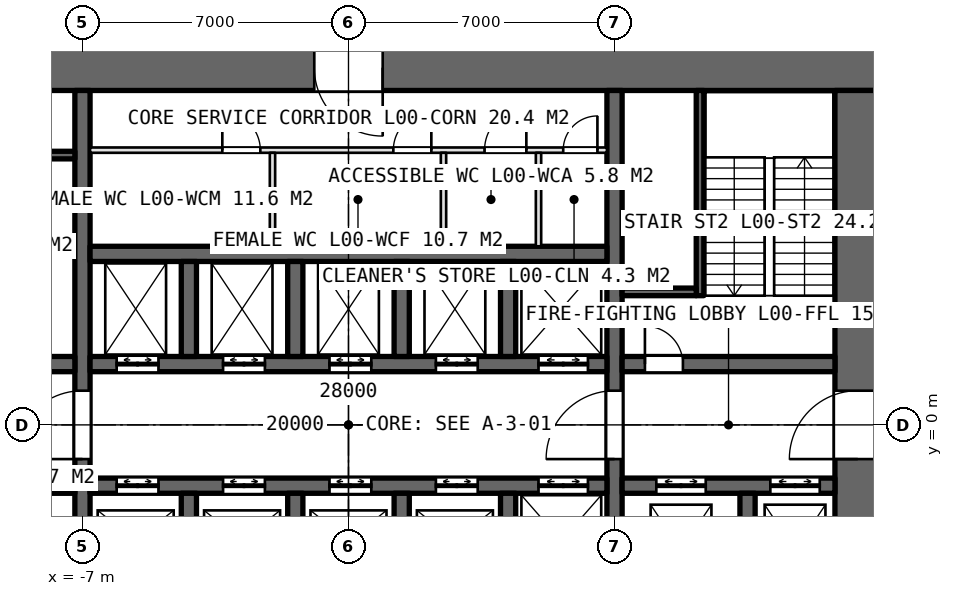
"""IFC4 building model, lengths in metres.
Left out: names, types, materials, properties, quantities, classifications, styles, units other than length and angle.
Written with IfcOpenShell. Run it as: python <this file> out.ifc"""

import sys

from ifc_helpers import new_model, si_unit, direction, frame, frame_2d, origin, place, context, subcontext, project, spatial, rectangle, extrude, element, fill, save


model = new_model("IFC4")
c1 = context("Model", 3, precision=1e-05, world=origin(), true_north=direction((0.0, 1.0)))
c2 = subcontext(c1, "Body", "Model", "MODEL_VIEW")
j1 = project(units=[si_unit("LENGTHUNIT", "METRE"), si_unit("PLANEANGLEUNIT", "RADIAN")], contexts=[c1])
p1 = place(None, origin())
s1 = spatial("IfcSite", under=j1, at=p1, CompositionType="ELEMENT")
p2 = place(p1, origin())
s2 = spatial("IfcBuilding", under=s1, at=p2, CompositionType="ELEMENT")
p3 = place(p2, origin())
s3 = spatial("IfcBuildingStorey", under=s2, at=p3, CompositionType="ELEMENT", Elevation=0.0)
p4 = place(p3, frame((14.0, 9.4, -0.3), z_axis=(0.0, 0.0, 1.0), x_axis=(-1.0, 0.0, 0.0)))
e1 = element("IfcWall", 1, at=p4, inside=s3, PredefinedType="SHEAR", context=c2, shape_type="SweptSolid", body=[
    extrude(rectangle(XDim=28.0, YDim=1.2, at=frame_2d((14.0, 0.0))), origin(), (0.0, 0.0, 1.0), 5.3),
])
p5 = place(p4, frame((24.0, 0.0, 0.3)))
e2 = element("IfcOpeningElement", 2, at=p5, cuts=e1, PredefinedType="OPENING", context=c2, shape_type="SweptSolid", body=[
    extrude(rectangle(XDim=1.0, YDim=2.4, at=frame_2d((0.5, 1.2))), frame((0.0, 0.61, 0.0), z_axis=(0.0, -1.0, 0.0), x_axis=(1.0, 0.0, 0.0)), (0.0, 0.0, 1.0), 1.22),
])
p6 = place(p4, frame((13.1, 0.0, 0.3)))
e3 = element("IfcOpeningElement", 3, at=p6, cuts=e1, PredefinedType="OPENING", context=c2, shape_type="SweptSolid", body=[
    extrude(rectangle(XDim=1.8, YDim=2.4, at=frame_2d((0.9, 1.2))), frame((0.0, 0.61, 0.0), z_axis=(0.0, -1.0, 0.0), x_axis=(1.0, 0.0, 0.0)), (0.0, 0.0, 1.0), 1.22),
])
p7 = place(p3, frame((13.4, -8.8, -0.3), z_axis=(0.0, 0.0, 1.0), x_axis=(0.0, 1.0, 0.0)))
e4 = element("IfcWall", 4, at=p7, inside=s3, PredefinedType="SHEAR", context=c2, shape_type="SweptSolid", body=[
    extrude(rectangle(XDim=17.6, YDim=1.2, at=frame_2d((8.8, 0.0))), origin(), (0.0, 0.0, 1.0), 5.3),
])
p8 = place(p7, frame((7.9, 0.0, 0.3)))
e5 = element("IfcOpeningElement", 5, at=p8, cuts=e4, PredefinedType="OPENING", context=c2, shape_type="SweptSolid", body=[
    extrude(rectangle(XDim=1.8, YDim=2.4, at=frame_2d((0.9, 1.2))), frame((0.0, 0.61, 0.0), z_axis=(0.0, -1.0, 0.0), x_axis=(1.0, 0.0, 0.0)), (0.0, 0.0, 1.0), 1.22),
])
p9 = place(p3, frame((-7.0, -8.8, -0.3), z_axis=(0.0, 0.0, 1.0), x_axis=(0.0, 1.0, 0.0)))
e6 = element("IfcWall", 6, at=p9, inside=s3, PredefinedType="SHEAR", context=c2, shape_type="SweptSolid", body=[
    extrude(rectangle(XDim=17.6, YDim=0.4, at=frame_2d((8.8, 0.0))), origin(), (0.0, 0.0, 1.0), 5.3),
])
p10 = place(p9, frame((7.9, 0.0, 0.3)))
e7 = element("IfcOpeningElement", 7, at=p10, cuts=e6, PredefinedType="OPENING", context=c2, shape_type="SweptSolid", body=[
    extrude(rectangle(XDim=1.8, YDim=2.4, at=frame_2d((0.9, 1.2))), frame((0.0, 0.21, 0.0), z_axis=(0.0, -1.0, 0.0), x_axis=(1.0, 0.0, 0.0)), (0.0, 0.0, 1.0), 0.42),
])
p11 = place(p3, frame((7.0, -8.8, -0.3), z_axis=(0.0, 0.0, 1.0), x_axis=(0.0, 1.0, 0.0)))
e8 = element("IfcWall", 8, at=p11, inside=s3, PredefinedType="SHEAR", context=c2, shape_type="SweptSolid", body=[
    extrude(rectangle(XDim=17.6, YDim=0.4, at=frame_2d((8.8, 0.0))), origin(), (0.0, 0.0, 1.0), 5.3),
])
p12 = place(p11, frame((7.9, 0.0, 0.3)))
e9 = element("IfcOpeningElement", 9, at=p12, cuts=e8, PredefinedType="OPENING", context=c2, shape_type="SweptSolid", body=[
    extrude(rectangle(XDim=1.8, YDim=2.4, at=frame_2d((0.9, 1.2))), frame((0.0, 0.21, 0.0), z_axis=(0.0, -1.0, 0.0), x_axis=(1.0, 0.0, 0.0)), (0.0, 0.0, 1.0), 0.42),
])
p13 = place(p3, frame((-6.8, 1.6, -0.3), z_axis=(0.0, 0.0, 1.0), x_axis=(1.0, 0.0, 0.0)))
e10 = element("IfcWall", 10, at=p13, inside=s3, PredefinedType="SHEAR", context=c2, shape_type="SweptSolid", body=[
    extrude(rectangle(XDim=13.6, YDim=0.4, at=frame_2d((6.8, 0.0))), origin(), (0.0, 0.0, 1.0), 5.3),
])
p14 = place(p13, frame((0.7, 0.0, 0.3)))
e11 = element("IfcOpeningElement", 11, at=p14, cuts=e10, PredefinedType="OPENING", context=c2, shape_type="SweptSolid", body=[
    extrude(rectangle(XDim=1.1, YDim=2.4, at=frame_2d((0.55, 1.2))), frame((0.0, 0.21, 0.0), z_axis=(0.0, -1.0, 0.0), x_axis=(1.0, 0.0, 0.0)), (0.0, 0.0, 1.0), 0.42),
])
p15 = place(p13, frame((3.5, 0.0, 0.3)))
e12 = element("IfcOpeningElement", 12, at=p15, cuts=e10, PredefinedType="OPENING", context=c2, shape_type="SweptSolid", body=[
    extrude(rectangle(XDim=1.1, YDim=2.4, at=frame_2d((0.55, 1.2))), frame((0.0, 0.21, 0.0), z_axis=(0.0, -1.0, 0.0), x_axis=(1.0, 0.0, 0.0)), (0.0, 0.0, 1.0), 0.42),
])
p16 = place(p13, frame((6.3, 0.0, 0.3)))
e13 = element("IfcOpeningElement", 13, at=p16, cuts=e10, PredefinedType="OPENING", context=c2, shape_type="SweptSolid", body=[
    extrude(rectangle(XDim=1.1, YDim=2.4, at=frame_2d((0.55, 1.2))), frame((0.0, 0.21, 0.0), z_axis=(0.0, -1.0, 0.0), x_axis=(1.0, 0.0, 0.0)), (0.0, 0.0, 1.0), 0.42),
])
p17 = place(p13, frame((9.1, 0.0, 0.3)))
e14 = element("IfcOpeningElement", 14, at=p17, cuts=e10, PredefinedType="OPENING", context=c2, shape_type="SweptSolid", body=[
    extrude(rectangle(XDim=1.1, YDim=2.4, at=frame_2d((0.55, 1.2))), frame((0.0, 0.21, 0.0), z_axis=(0.0, -1.0, 0.0), x_axis=(1.0, 0.0, 0.0)), (0.0, 0.0, 1.0), 0.42),
])
p18 = place(p13, frame((11.8, 0.0, 0.3)))
e15 = element("IfcOpeningElement", 15, at=p18, cuts=e10, PredefinedType="OPENING", context=c2, shape_type="SweptSolid", body=[
    extrude(rectangle(XDim=1.3, YDim=2.4, at=frame_2d((0.65, 1.2))), frame((0.0, 0.21, 0.0), z_axis=(0.0, -1.0, 0.0), x_axis=(1.0, 0.0, 0.0)), (0.0, 0.0, 1.0), 0.42),
])
p19 = place(p3, frame((-6.8, -1.6, -0.3), z_axis=(0.0, 0.0, 1.0), x_axis=(1.0, 0.0, 0.0)))
e16 = element("IfcWall", 16, at=p19, inside=s3, PredefinedType="SHEAR", context=c2, shape_type="SweptSolid", body=[
    extrude(rectangle(XDim=13.6, YDim=0.4, at=frame_2d((6.8, 0.0))), origin(), (0.0, 0.0, 1.0), 5.3),
])
p20 = place(p19, frame((0.7, 0.0, 0.3)))
e17 = element("IfcOpeningElement", 17, at=p20, cuts=e16, PredefinedType="OPENING", context=c2, shape_type="SweptSolid", body=[
    extrude(rectangle(XDim=1.1, YDim=2.4, at=frame_2d((0.55, 1.2))), frame((0.0, 0.21, 0.0), z_axis=(0.0, -1.0, 0.0), x_axis=(1.0, 0.0, 0.0)), (0.0, 0.0, 1.0), 0.42),
])
p21 = place(p19, frame((3.5, 0.0, 0.3)))
e18 = element("IfcOpeningElement", 18, at=p21, cuts=e16, PredefinedType="OPENING", context=c2, shape_type="SweptSolid", body=[
    extrude(rectangle(XDim=1.1, YDim=2.4, at=frame_2d((0.55, 1.2))), frame((0.0, 0.21, 0.0), z_axis=(0.0, -1.0, 0.0), x_axis=(1.0, 0.0, 0.0)), (0.0, 0.0, 1.0), 0.42),
])
p22 = place(p19, frame((6.3, 0.0, 0.3)))
e19 = element("IfcOpeningElement", 19, at=p22, cuts=e16, PredefinedType="OPENING", context=c2, shape_type="SweptSolid", body=[
    extrude(rectangle(XDim=1.1, YDim=2.4, at=frame_2d((0.55, 1.2))), frame((0.0, 0.21, 0.0), z_axis=(0.0, -1.0, 0.0), x_axis=(1.0, 0.0, 0.0)), (0.0, 0.0, 1.0), 0.42),
])
p23 = place(p19, frame((9.1, 0.0, 0.3)))
e20 = element("IfcOpeningElement", 20, at=p23, cuts=e16, PredefinedType="OPENING", context=c2, shape_type="SweptSolid", body=[
    extrude(rectangle(XDim=1.1, YDim=2.4, at=frame_2d((0.55, 1.2))), frame((0.0, 0.21, 0.0), z_axis=(0.0, -1.0, 0.0), x_axis=(1.0, 0.0, 0.0)), (0.0, 0.0, 1.0), 0.42),
])
p24 = place(p19, frame((11.8, 0.0, 0.3)))
e21 = element("IfcOpeningElement", 21, at=p24, cuts=e16, PredefinedType="OPENING", context=c2, shape_type="SweptSolid", body=[
    extrude(rectangle(XDim=1.3, YDim=2.4, at=frame_2d((0.65, 1.2))), frame((0.0, 0.21, 0.0), z_axis=(0.0, -1.0, 0.0), x_axis=(1.0, 0.0, 0.0)), (0.0, 0.0, 1.0), 0.42),
])
p25 = place(p3, frame((-6.8, 4.5, -0.3), z_axis=(0.0, 0.0, 1.0), x_axis=(1.0, 0.0, 0.0)))
e22 = element("IfcWall", 22, at=p25, inside=s3, PredefinedType="SHEAR", context=c2, shape_type="SweptSolid", body=[
    extrude(rectangle(XDim=13.6, YDim=0.4, at=frame_2d((6.8, 0.0))), origin(), (0.0, 0.0, 1.0), 5.3),
])
for number, where, z_axis, x_axis in (
    (23, (-12.8, 1.6, -0.3), (0.0, 0.0, 1.0), (1.0, 0.0, 0.0)),
    (24, (-12.8, -1.6, -0.3), (0.0, 0.0, 1.0), (1.0, 0.0, 0.0)),
):
    element("IfcWall", number, at=place(p3, frame(where, z_axis=z_axis, x_axis=x_axis)), inside=s3, PredefinedType="SHEAR", context=c2, shape_type="SweptSolid", body=[
        extrude(rectangle(XDim=5.6, YDim=0.4, at=frame_2d((2.8, 0.0))), origin(), (0.0, 0.0, 1.0), 5.3),
    ])
p26 = place(p3, frame((7.2, 1.6, -0.3), z_axis=(0.0, 0.0, 1.0), x_axis=(1.0, 0.0, 0.0)))
e25 = element("IfcWall", 25, at=p26, inside=s3, PredefinedType="SHEAR", context=c2, shape_type="SweptSolid", body=[
    extrude(rectangle(XDim=5.6, YDim=0.4, at=frame_2d((2.8, 0.0))), origin(), (0.0, 0.0, 1.0), 5.3),
])
p27 = place(p26, frame((0.6, 0.0, 0.3)))
e26 = element("IfcOpeningElement", 26, at=p27, cuts=e25, PredefinedType="OPENING", context=c2, shape_type="SweptSolid", body=[
    extrude(rectangle(XDim=1.0, YDim=2.4, at=frame_2d((0.5, 1.2))), frame((0.0, 0.21, 0.0), z_axis=(0.0, -1.0, 0.0), x_axis=(1.0, 0.0, 0.0)), (0.0, 0.0, 1.0), 0.42),
])
p28 = place(p3, frame((7.2, -1.6, -0.3), z_axis=(0.0, 0.0, 1.0), x_axis=(1.0, 0.0, 0.0)))
e27 = element("IfcWall", 27, at=p28, inside=s3, PredefinedType="SHEAR", context=c2, shape_type="SweptSolid", body=[
    extrude(rectangle(XDim=5.6, YDim=0.4, at=frame_2d((2.8, 0.0))), origin(), (0.0, 0.0, 1.0), 5.3),
])
p29 = place(p28, frame((0.9, 0.0, 0.3)))
e28 = element("IfcOpeningElement", 28, at=p29, cuts=e27, PredefinedType="OPENING", context=c2, shape_type="SweptSolid", body=[
    extrude(rectangle(XDim=1.3, YDim=2.4, at=frame_2d((0.65, 1.2))), frame((0.0, 0.21, 0.0), z_axis=(0.0, -1.0, 0.0), x_axis=(1.0, 0.0, 0.0)), (0.0, 0.0, 1.0), 0.42),
])
p30 = place(p28, frame((3.9, 0.0, 0.3)))
e29 = element("IfcOpeningElement", 29, at=p30, cuts=e27, PredefinedType="OPENING", context=c2, shape_type="SweptSolid", body=[
    extrude(rectangle(XDim=1.3, YDim=2.4, at=frame_2d((0.65, 1.2))), frame((0.0, 0.21, 0.0), z_axis=(0.0, -1.0, 0.0), x_axis=(1.0, 0.0, 0.0)), (0.0, 0.0, 1.0), 0.42),
])
p31 = place(p3, frame((10.5, -4.8, -0.3), z_axis=(0.0, 0.0, 1.0), x_axis=(0.0, 1.0, 0.0)))
e30 = element("IfcWall", 30, at=p31, inside=s3, PredefinedType="SHEAR", context=c2, shape_type="SweptSolid", body=[
    extrude(rectangle(XDim=3.0, YDim=0.4, at=frame_2d((1.5, 0.0))), origin(), (0.0, 0.0, 1.0), 5.3),
])
for number, where, z_axis, x_axis in (
    (31, (-4.2, 1.8, -0.3), (0.0, 0.0, 1.0), (0.0, 1.0, 0.0)),
    (32, (-4.2, -4.3, -0.3), (0.0, 0.0, 1.0), (0.0, 1.0, 0.0)),
    (33, (-1.4, 1.8, -0.3), (0.0, 0.0, 1.0), (0.0, 1.0, 0.0)),
    (34, (-1.4, -4.3, -0.3), (0.0, 0.0, 1.0), (0.0, 1.0, 0.0)),
    (35, (1.4, 1.8, -0.3), (0.0, 0.0, 1.0), (0.0, 1.0, 0.0)),
    (36, (1.4, -4.3, -0.3), (0.0, 0.0, 1.0), (0.0, 1.0, 0.0)),
    (37, (4.2, 1.8, -0.3), (0.0, 0.0, 1.0), (0.0, 1.0, 0.0)),
    (38, (4.2, -4.3, -0.3), (0.0, 0.0, 1.0), (0.0, 1.0, 0.0)),
):
    element("IfcWall", number, at=place(p3, frame(where, z_axis=z_axis, x_axis=x_axis)), inside=s3, PredefinedType="SHEAR", context=c2, shape_type="SweptSolid", body=[
        extrude(rectangle(XDim=2.5, YDim=0.4, at=frame_2d((1.25, 0.0))), origin(), (0.0, 0.0, 1.0), 5.3),
    ])
p32 = place(p3, frame((-6.8, 7.23, 0.0), z_axis=(0.0, 0.0, 1.0), x_axis=(1.0, 0.0, 0.0)))
e39 = element("IfcWall", 39, at=p32, inside=s3, PredefinedType="PARTITIONING", context=c2, shape_type="SweptSolid", body=[
    extrude(rectangle(XDim=13.6, YDim=0.14, at=frame_2d((6.8, 0.0))), origin(), (0.0, 0.0, 1.0), 4.75),
])
p33 = place(p32, frame((3.48, 0.0, 0.0)))
e40 = element("IfcOpeningElement", 40, at=p33, cuts=e39, PredefinedType="OPENING", context=c2, shape_type="SweptSolid", body=[
    extrude(rectangle(XDim=1.0, YDim=2.4, at=frame_2d((0.5, 1.2))), frame((0.0, 0.08, 0.0), z_axis=(0.0, -1.0, 0.0), x_axis=(1.0, 0.0, 0.0)), (0.0, 0.0, 1.0), 0.16),
])
p34 = place(p32, frame((7.98, 0.0, 0.0)))
e41 = element("IfcOpeningElement", 41, at=p34, cuts=e39, PredefinedType="OPENING", context=c2, shape_type="SweptSolid", body=[
    extrude(rectangle(XDim=1.0, YDim=2.4, at=frame_2d((0.5, 1.2))), frame((0.0, 0.08, 0.0), z_axis=(0.0, -1.0, 0.0), x_axis=(1.0, 0.0, 0.0)), (0.0, 0.0, 1.0), 0.16),
])
p35 = place(p32, frame((10.38, 0.0, 0.0)))
e42 = element("IfcOpeningElement", 42, at=p35, cuts=e39, PredefinedType="OPENING", context=c2, shape_type="SweptSolid", body=[
    extrude(rectangle(XDim=1.1, YDim=2.4, at=frame_2d((0.55, 1.2))), frame((0.0, 0.08, 0.0), z_axis=(0.0, -1.0, 0.0), x_axis=(1.0, 0.0, 0.0)), (0.0, 0.0, 1.0), 0.16),
])
p36 = place(p32, frame((12.45, 0.0, 0.0)))
e43 = element("IfcOpeningElement", 43, at=p36, cuts=e39, PredefinedType="OPENING", context=c2, shape_type="SweptSolid", body=[
    extrude(rectangle(XDim=0.9, YDim=2.4, at=frame_2d((0.45, 1.2))), frame((0.0, 0.08, 0.0), z_axis=(0.0, -1.0, 0.0), x_axis=(1.0, 0.0, 0.0)), (0.0, 0.0, 1.0), 0.16),
])
for number, where, z_axis, x_axis in (
    (44, (-2.0, 4.7, 0.0), (0.0, 0.0, 1.0), (0.0, 1.0, 0.0)),
    (45, (2.5, 4.7, 0.0), (0.0, 0.0, 1.0), (0.0, 1.0, 0.0)),
    (46, (5.0, 4.7, 0.0), (0.0, 0.0, 1.0), (0.0, 1.0, 0.0)),
):
    element("IfcWall", number, at=place(p3, frame(where, z_axis=z_axis, x_axis=x_axis)), inside=s3, PredefinedType="PARTITIONING", context=c2, shape_type="SweptSolid", body=[
        extrude(rectangle(XDim=2.46, YDim=0.14, at=frame_2d((1.23, 0.0))), origin(), (0.0, 0.0, 1.0), 4.75),
    ])
p37 = place(p3, frame((-9.15, 7.1, -0.3), z_axis=(0.0, 0.0, 1.0), x_axis=(1.0, 0.0, 0.0)))
e47 = element("IfcWall", 47, at=p37, inside=s3, PredefinedType="SOLIDWALL", context=c2, shape_type="SweptSolid", body=[
    extrude(rectangle(XDim=1.95, YDim=0.2, at=frame_2d((0.975, 0.0))), origin(), (0.0, 0.0, 1.0), 5.3),
])
p38 = place(p3, frame((9.25, 3.4, -0.3), z_axis=(0.0, 0.0, 1.0), x_axis=(0.0, 1.0, 0.0)))
e48 = element("IfcWall", 48, at=p38, inside=s3, PredefinedType="SOLIDWALL", context=c2, shape_type="SweptSolid", body=[
    extrude(rectangle(XDim=5.4, YDim=0.2, at=frame_2d((2.7, 0.0))), origin(), (0.0, 0.0, 1.0), 5.3),
])
p39 = place(p3, frame((9.15, 3.5, -0.3), z_axis=(0.0, 0.0, 1.0), x_axis=(-1.0, 0.0, 0.0)))
e49 = element("IfcWall", 49, at=p39, inside=s3, PredefinedType="SOLIDWALL", context=c2, shape_type="SweptSolid", body=[
    extrude(rectangle(XDim=1.95, YDim=0.2, at=frame_2d((0.975, 0.0))), origin(), (0.0, 0.0, 1.0), 5.3),
])
p40 = place(p8, origin())
e50 = element("IfcDoor", 50, at=p40, inside=s3, OperationType="DOUBLE_DOOR_SINGLE_SWING", PredefinedType="DOOR", context=c2, shape_type="SweptSolid", body=[
    extrude(rectangle(XDim=1.8, YDim=2.4, at=frame_2d((0.9, 1.2))), frame((0.0, 0.025, 0.0), z_axis=(0.0, -1.0, 0.0), x_axis=(1.0, 0.0, 0.0)), (0.0, 0.0, 1.0), 0.05),
])
fill(e5, e50)
p41 = place(p10, origin())
e51 = element("IfcDoor", 51, at=p41, inside=s3, OperationType="DOUBLE_DOOR_SINGLE_SWING", PredefinedType="DOOR", context=c2, shape_type="SweptSolid", body=[
    extrude(rectangle(XDim=1.8, YDim=2.4, at=frame_2d((0.9, 1.2))), frame((0.0, 0.025, 0.0), z_axis=(0.0, -1.0, 0.0), x_axis=(1.0, 0.0, 0.0)), (0.0, 0.0, 1.0), 0.05),
])
fill(e7, e51)
p42 = place(p12, origin())
e52 = element("IfcDoor", 52, at=p42, inside=s3, OperationType="DOUBLE_DOOR_SINGLE_SWING", PredefinedType="DOOR", context=c2, shape_type="SweptSolid", body=[
    extrude(rectangle(XDim=1.8, YDim=2.4, at=frame_2d((0.9, 1.2))), frame((0.0, 0.025, 0.0), z_axis=(0.0, -1.0, 0.0), x_axis=(1.0, 0.0, 0.0)), (0.0, 0.0, 1.0), 0.05),
])
fill(e9, e52)
p43 = place(p27, origin())
e53 = element("IfcDoor", 53, at=p43, inside=s3, OperationType="SINGLE_SWING_LEFT", PredefinedType="DOOR", context=c2, shape_type="SweptSolid", body=[
    extrude(rectangle(XDim=1.0, YDim=2.4, at=frame_2d((0.5, 1.2))), frame((0.0, 0.025, 0.0), z_axis=(0.0, -1.0, 0.0), x_axis=(1.0, 0.0, 0.0)), (0.0, 0.0, 1.0), 0.05),
])
fill(e26, e53)
p44 = place(p33, origin())
e54 = element("IfcDoor", 54, at=p44, inside=s3, OperationType="SINGLE_SWING_LEFT", PredefinedType="DOOR", context=c2, shape_type="SweptSolid", body=[
    extrude(rectangle(XDim=1.0, YDim=2.4, at=frame_2d((0.5, 1.2))), frame((0.0, 0.025, 0.0), z_axis=(0.0, -1.0, 0.0), x_axis=(1.0, 0.0, 0.0)), (0.0, 0.0, 1.0), 0.05),
])
fill(e40, e54)
p45 = place(p34, origin())
e55 = element("IfcDoor", 55, at=p45, inside=s3, OperationType="SINGLE_SWING_RIGHT", PredefinedType="DOOR", context=c2, shape_type="SweptSolid", body=[
    extrude(rectangle(XDim=1.0, YDim=2.4, at=frame_2d((0.5, 1.2))), frame((0.0, 0.025, 0.0), z_axis=(0.0, -1.0, 0.0), x_axis=(1.0, 0.0, 0.0)), (0.0, 0.0, 1.0), 0.05),
])
fill(e41, e55)
p46 = place(p35, origin())
e56 = element("IfcDoor", 56, at=p46, inside=s3, OperationType="SINGLE_SWING_RIGHT", PredefinedType="DOOR", context=c2, shape_type="SweptSolid", body=[
    extrude(rectangle(XDim=1.1, YDim=2.4, at=frame_2d((0.55, 1.2))), frame((0.0, 0.025, 0.0), z_axis=(0.0, -1.0, 0.0), x_axis=(1.0, 0.0, 0.0)), (0.0, 0.0, 1.0), 0.05),
])
fill(e42, e56)
p47 = place(p36, origin())
e57 = element("IfcDoor", 57, at=p47, inside=s3, OperationType="SINGLE_SWING_RIGHT", PredefinedType="DOOR", context=c2, shape_type="SweptSolid", body=[
    extrude(rectangle(XDim=0.9, YDim=2.4, at=frame_2d((0.45, 1.2))), frame((0.0, 0.025, 0.0), z_axis=(0.0, -1.0, 0.0), x_axis=(1.0, 0.0, 0.0)), (0.0, 0.0, 1.0), 0.05),
])
fill(e43, e57)
p48 = place(p6, origin())
e58 = element("IfcDoor", 58, at=p48, inside=s3, OperationType="DOUBLE_DOOR_SINGLE_SWING", PredefinedType="DOOR", context=c2, shape_type="SweptSolid", body=[
    extrude(rectangle(XDim=1.8, YDim=2.4, at=frame_2d((0.9, 1.2))), frame((0.0, 0.025, 0.0), z_axis=(0.0, -1.0, 0.0), x_axis=(1.0, 0.0, 0.0)), (0.0, 0.0, 1.0), 0.05),
])
fill(e3, e58)
p49 = place(p14, origin())
e59 = element("IfcDoor", 59, at=p49, inside=s3, OperationType="DOUBLE_DOOR_SLIDING", PredefinedType="DOOR", context=c2, shape_type="SweptSolid", body=[
    extrude(rectangle(XDim=1.1, YDim=2.4, at=frame_2d((0.55, 1.2))), frame((0.0, 0.025, 0.0), z_axis=(0.0, -1.0, 0.0), x_axis=(1.0, 0.0, 0.0)), (0.0, 0.0, 1.0), 0.05),
])
fill(e11, e59)
p50 = place(p20, origin())
e60 = element("IfcDoor", 60, at=p50, inside=s3, OperationType="DOUBLE_DOOR_SLIDING", PredefinedType="DOOR", context=c2, shape_type="SweptSolid", body=[
    extrude(rectangle(XDim=1.1, YDim=2.4, at=frame_2d((0.55, 1.2))), frame((0.0, 0.025, 0.0), z_axis=(0.0, -1.0, 0.0), x_axis=(1.0, 0.0, 0.0)), (0.0, 0.0, 1.0), 0.05),
])
fill(e17, e60)
p51 = place(p15, origin())
e61 = element("IfcDoor", 61, at=p51, inside=s3, OperationType="DOUBLE_DOOR_SLIDING", PredefinedType="DOOR", context=c2, shape_type="SweptSolid", body=[
    extrude(rectangle(XDim=1.1, YDim=2.4, at=frame_2d((0.55, 1.2))), frame((0.0, 0.025, 0.0), z_axis=(0.0, -1.0, 0.0), x_axis=(1.0, 0.0, 0.0)), (0.0, 0.0, 1.0), 0.05),
])
fill(e12, e61)
p52 = place(p21, origin())
e62 = element("IfcDoor", 62, at=p52, inside=s3, OperationType="DOUBLE_DOOR_SLIDING", PredefinedType="DOOR", context=c2, shape_type="SweptSolid", body=[
    extrude(rectangle(XDim=1.1, YDim=2.4, at=frame_2d((0.55, 1.2))), frame((0.0, 0.025, 0.0), z_axis=(0.0, -1.0, 0.0), x_axis=(1.0, 0.0, 0.0)), (0.0, 0.0, 1.0), 0.05),
])
fill(e18, e62)
p53 = place(p16, origin())
e63 = element("IfcDoor", 63, at=p53, inside=s3, OperationType="DOUBLE_DOOR_SLIDING", PredefinedType="DOOR", context=c2, shape_type="SweptSolid", body=[
    extrude(rectangle(XDim=1.1, YDim=2.4, at=frame_2d((0.55, 1.2))), frame((0.0, 0.025, 0.0), z_axis=(0.0, -1.0, 0.0), x_axis=(1.0, 0.0, 0.0)), (0.0, 0.0, 1.0), 0.05),
])
fill(e13, e63)
p54 = place(p22, origin())
e64 = element("IfcDoor", 64, at=p54, inside=s3, OperationType="DOUBLE_DOOR_SLIDING", PredefinedType="DOOR", context=c2, shape_type="SweptSolid", body=[
    extrude(rectangle(XDim=1.1, YDim=2.4, at=frame_2d((0.55, 1.2))), frame((0.0, 0.025, 0.0), z_axis=(0.0, -1.0, 0.0), x_axis=(1.0, 0.0, 0.0)), (0.0, 0.0, 1.0), 0.05),
])
fill(e19, e64)
p55 = place(p17, origin())
e65 = element("IfcDoor", 65, at=p55, inside=s3, OperationType="DOUBLE_DOOR_SLIDING", PredefinedType="DOOR", context=c2, shape_type="SweptSolid", body=[
    extrude(rectangle(XDim=1.1, YDim=2.4, at=frame_2d((0.55, 1.2))), frame((0.0, 0.025, 0.0), z_axis=(0.0, -1.0, 0.0), x_axis=(1.0, 0.0, 0.0)), (0.0, 0.0, 1.0), 0.05),
])
fill(e14, e65)
p56 = place(p23, origin())
e66 = element("IfcDoor", 66, at=p56, inside=s3, OperationType="DOUBLE_DOOR_SLIDING", PredefinedType="DOOR", context=c2, shape_type="SweptSolid", body=[
    extrude(rectangle(XDim=1.1, YDim=2.4, at=frame_2d((0.55, 1.2))), frame((0.0, 0.025, 0.0), z_axis=(0.0, -1.0, 0.0), x_axis=(1.0, 0.0, 0.0)), (0.0, 0.0, 1.0), 0.05),
])
fill(e20, e66)
p57 = place(p18, origin())
e67 = element("IfcDoor", 67, at=p57, inside=s3, OperationType="DOUBLE_DOOR_SLIDING", PredefinedType="DOOR", context=c2, shape_type="SweptSolid", body=[
    extrude(rectangle(XDim=1.3, YDim=2.4, at=frame_2d((0.65, 1.2))), frame((0.0, 0.025, 0.0), z_axis=(0.0, -1.0, 0.0), x_axis=(1.0, 0.0, 0.0)), (0.0, 0.0, 1.0), 0.05),
])
fill(e15, e67)
p58 = place(p24, origin())
e68 = element("IfcDoor", 68, at=p58, inside=s3, OperationType="DOUBLE_DOOR_SLIDING", PredefinedType="DOOR", context=c2, shape_type="SweptSolid", body=[
    extrude(rectangle(XDim=1.3, YDim=2.4, at=frame_2d((0.65, 1.2))), frame((0.0, 0.025, 0.0), z_axis=(0.0, -1.0, 0.0), x_axis=(1.0, 0.0, 0.0)), (0.0, 0.0, 1.0), 0.05),
])
fill(e21, e68)
p59 = place(p29, origin())
e69 = element("IfcDoor", 69, at=p59, inside=s3, OperationType="DOUBLE_DOOR_SLIDING", PredefinedType="DOOR", context=c2, shape_type="SweptSolid", body=[
    extrude(rectangle(XDim=1.3, YDim=2.4, at=frame_2d((0.65, 1.2))), frame((0.0, 0.025, 0.0), z_axis=(0.0, -1.0, 0.0), x_axis=(1.0, 0.0, 0.0)), (0.0, 0.0, 1.0), 0.05),
])
fill(e28, e69)
p60 = place(p30, origin())
e70 = element("IfcDoor", 70, at=p60, inside=s3, OperationType="DOUBLE_DOOR_SLIDING", PredefinedType="DOOR", context=c2, shape_type="SweptSolid", body=[
    extrude(rectangle(XDim=1.3, YDim=2.4, at=frame_2d((0.65, 1.2))), frame((0.0, 0.025, 0.0), z_axis=(0.0, -1.0, 0.0), x_axis=(1.0, 0.0, 0.0)), (0.0, 0.0, 1.0), 0.05),
])
fill(e29, e70)
save(model, sys.argv[1])
